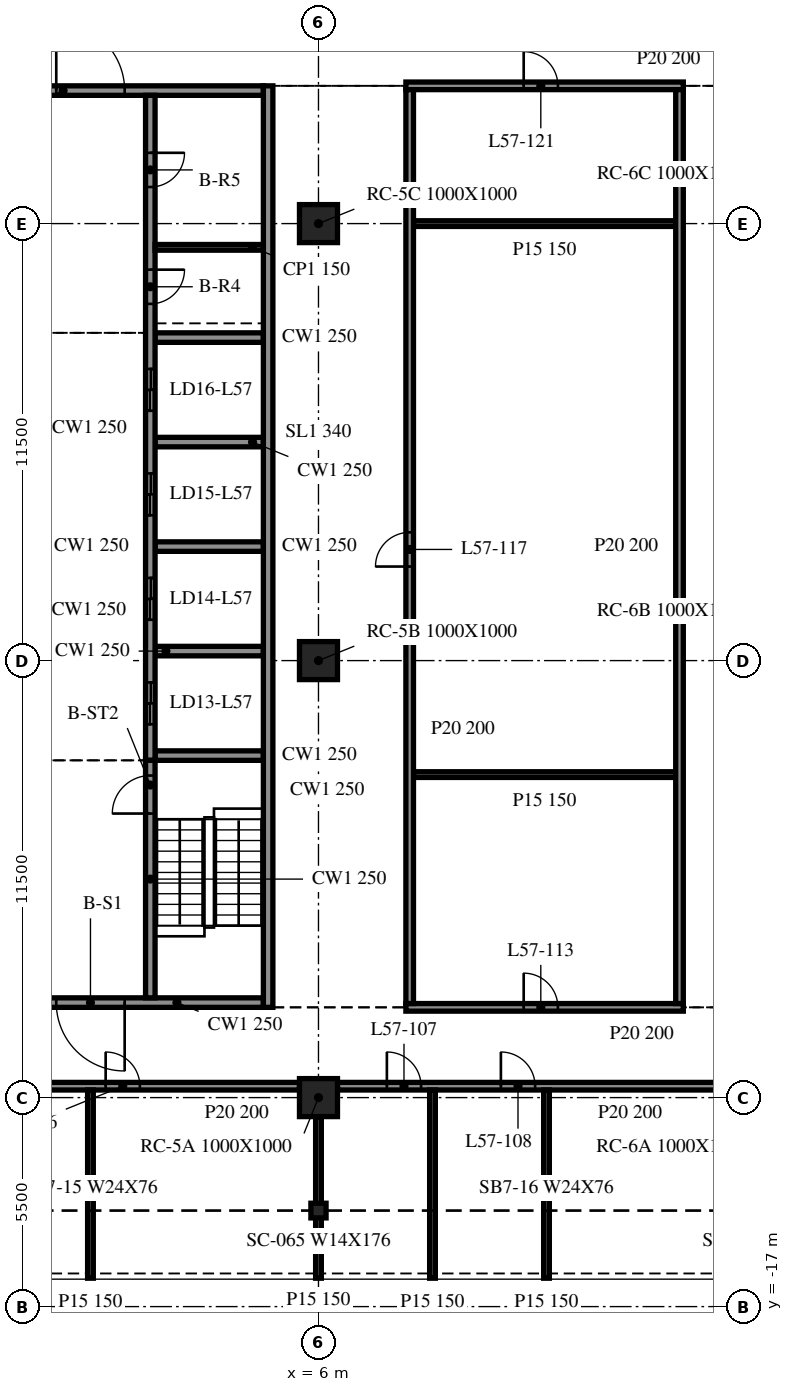
"""IFC4 building model, lengths in metres.
Left out: names, types, materials, properties, quantities, classifications, styles, units other than length and angle.
Written with IfcOpenShell. Run it as: python <this file> out.ifc"""

import sys

from ifc_helpers import new_model, si_unit, direction, frame, frame_2d, origin, origin_2d, place, context, subcontext, project, spatial, rectangle, i_section, extrude, element, fill, save


model = new_model("IFC4")
c1 = context("Model", 3, precision=1e-05, world=origin(), true_north=direction((0.0, 1.0)))
c2 = subcontext(c1, "Body", "Model", "MODEL_VIEW")
j1 = project(units=[si_unit("LENGTHUNIT", "METRE"), si_unit("PLANEANGLEUNIT", "RADIAN")], contexts=[c1])
p1 = place(None, origin())
s1 = spatial("IfcSite", under=j1, at=p1, CompositionType="ELEMENT")
p2 = place(p1, origin())
s2 = spatial("IfcBuilding", under=s1, at=p2, CompositionType="ELEMENT")
p3 = place(p2, frame((0.0, 0.0, 236.2)))
s3 = spatial("IfcBuildingStorey", under=s2, at=p3, CompositionType="ELEMENT", Elevation=236.2)
for number, where, z_axis, x_axis in (
    (1, (6.0, -11.5, -0.34), (0.0, 0.0, 1.0), (1.0, 0.0, 0.0)),
    (2, (6.0, 0.0, -0.34), (0.0, 0.0, 1.0), (1.0, 0.0, 0.0)),
    (3, (6.0, 11.5, -0.34), (0.0, 0.0, 1.0), (1.0, 0.0, 0.0)),
):
    element("IfcColumn", number, at=place(p3, frame(where, z_axis=z_axis, x_axis=x_axis)), inside=s3, PredefinedType="COLUMN", context=c2, shape_type="SweptSolid", body=[
        extrude(rectangle(XDim=1.0, YDim=1.0, at=origin_2d()), origin(), (0.0, 0.0, 1.0), 3.8),
    ])
p4 = place(p3, frame((6.0, -14.473, -0.34), z_axis=(0.0, 0.0, 1.0), x_axis=(1.0, 0.0, 0.0)))
e4 = element("IfcColumn", 4, at=p4, inside=s3, PredefinedType="COLUMN", context=c2, shape_type="SweptSolid", body=[
    extrude(i_section(OverallWidth=0.399, OverallDepth=0.386, WebThickness=0.021, FlangeThickness=0.033, at=origin_2d()), origin(), (0.0, 0.0, 1.0), 3.8),
])
p5 = place(p3, frame((4.675, -9.125, 0.0), z_axis=(0.0, 0.0, 1.0), x_axis=(0.0, 1.0, 0.0)))
e5 = element("IfcWall", 5, at=p5, inside=s3, PredefinedType="SOLIDWALL", context=c2, shape_type="SweptSolid", body=[
    extrude(rectangle(XDim=24.25, YDim=0.25, at=frame_2d((12.125, 0.0))), origin(), (0.0, 0.0, 1.0), 3.46),
])
p6 = place(p3, frame((4.55, -9.0, 0.0), z_axis=(0.0, 0.0, 1.0), x_axis=(-1.0, 0.0, 0.0)))
e6 = element("IfcWall", 6, at=p6, inside=s3, PredefinedType="SOLIDWALL", context=c2, shape_type="SweptSolid", body=[
    extrude(rectangle(XDim=9.1, YDim=0.25, at=frame_2d((4.55, 0.0))), origin(), (0.0, 0.0, 1.0), 3.46),
])
p7 = place(p6, frame((3.65, 0.0, 0.0)))
e7 = element("IfcOpeningElement", 7, at=p7, cuts=e6, PredefinedType="OPENING", context=c2, shape_type="SweptSolid", body=[
    extrude(rectangle(XDim=1.8, YDim=2.1, at=frame_2d((0.9, 1.05))), frame((0.0, 0.135, 0.0), z_axis=(0.0, -1.0, 0.0), x_axis=(1.0, 0.0, 0.0)), (0.0, 0.0, 1.0), 0.27),
])
p8 = place(p3, frame((-4.55, 15.0, 0.0), z_axis=(0.0, 0.0, 1.0), x_axis=(1.0, 0.0, 0.0)))
e8 = element("IfcWall", 8, at=p8, inside=s3, PredefinedType="SOLIDWALL", context=c2, shape_type="SweptSolid", body=[
    extrude(rectangle(XDim=9.1, YDim=0.25, at=frame_2d((4.55, 0.0))), origin(), (0.0, 0.0, 1.0), 3.46),
])
p9 = place(p8, frame((3.65, 0.0, 0.0)))
e9 = element("IfcOpeningElement", 9, at=p9, cuts=e8, PredefinedType="OPENING", context=c2, shape_type="SweptSolid", body=[
    extrude(rectangle(XDim=1.8, YDim=2.1, at=frame_2d((0.9, 1.05))), frame((0.0, 0.135, 0.0), z_axis=(0.0, -1.0, 0.0), x_axis=(1.0, 0.0, 0.0)), (0.0, 0.0, 1.0), 0.27),
])
p10 = place(p3, frame((1.575, -8.875, 0.0), z_axis=(0.0, 0.0, 1.0), x_axis=(0.0, 1.0, 0.0)))
e10 = element("IfcWall", 10, at=p10, inside=s3, PredefinedType="SOLIDWALL", context=c2, shape_type="SweptSolid", body=[
    extrude(rectangle(XDim=6.25, YDim=0.25, at=frame_2d((3.125, 0.0))), origin(), (0.0, 0.0, 1.0), 3.46),
])
p11 = place(p10, frame((4.85, 0.0, 0.0)))
e11 = element("IfcOpeningElement", 11, at=p11, cuts=e10, PredefinedType="OPENING", context=c2, shape_type="SweptSolid", body=[
    extrude(rectangle(XDim=1.0, YDim=2.1, at=frame_2d((0.5, 1.05))), frame((0.0, 0.135, 0.0), z_axis=(0.0, -1.0, 0.0), x_axis=(1.0, 0.0, 0.0)), (0.0, 0.0, 1.0), 0.27),
])
p12 = place(p3, frame((1.575, 14.875, 0.0), z_axis=(0.0, 0.0, 1.0), x_axis=(0.0, -1.0, 0.0)))
e12 = element("IfcWall", 12, at=p12, inside=s3, PredefinedType="SOLIDWALL", context=c2, shape_type="SweptSolid", body=[
    extrude(rectangle(XDim=17.5, YDim=0.25, at=frame_2d((8.75, 0.0))), origin(), (0.0, 0.0, 1.0), 3.46),
])
p13 = place(p12, frame((15.45, 0.0, 0.0)))
e13 = element("IfcOpeningElement", 13, at=p13, cuts=e12, PredefinedType="OPENING", context=c2, shape_type="SweptSolid", body=[
    extrude(rectangle(XDim=1.1, YDim=2.1, at=frame_2d((0.55, 1.05))), frame((0.0, 0.135, 0.0), z_axis=(0.0, -1.0, 0.0), x_axis=(1.0, 0.0, 0.0)), (0.0, 0.0, 1.0), 0.27),
])
p14 = place(p12, frame((12.7, 0.0, 0.0)))
e14 = element("IfcOpeningElement", 14, at=p14, cuts=e12, PredefinedType="OPENING", context=c2, shape_type="SweptSolid", body=[
    extrude(rectangle(XDim=1.1, YDim=2.1, at=frame_2d((0.55, 1.05))), frame((0.0, 0.135, 0.0), z_axis=(0.0, -1.0, 0.0), x_axis=(1.0, 0.0, 0.0)), (0.0, 0.0, 1.0), 0.27),
])
p15 = place(p12, frame((9.95, 0.0, 0.0)))
e15 = element("IfcOpeningElement", 15, at=p15, cuts=e12, PredefinedType="OPENING", context=c2, shape_type="SweptSolid", body=[
    extrude(rectangle(XDim=1.1, YDim=2.1, at=frame_2d((0.55, 1.05))), frame((0.0, 0.135, 0.0), z_axis=(0.0, -1.0, 0.0), x_axis=(1.0, 0.0, 0.0)), (0.0, 0.0, 1.0), 0.27),
])
p16 = place(p12, frame((7.2, 0.0, 0.0)))
e16 = element("IfcOpeningElement", 16, at=p16, cuts=e12, PredefinedType="OPENING", context=c2, shape_type="SweptSolid", body=[
    extrude(rectangle(XDim=1.1, YDim=2.1, at=frame_2d((0.55, 1.05))), frame((0.0, 0.135, 0.0), z_axis=(0.0, -1.0, 0.0), x_axis=(1.0, 0.0, 0.0)), (0.0, 0.0, 1.0), 0.27),
])
p17 = place(p12, frame((4.587, 0.0, 0.0)))
e17 = element("IfcOpeningElement", 17, at=p17, cuts=e12, PredefinedType="OPENING", context=c2, shape_type="SweptSolid", body=[
    extrude(rectangle(XDim=0.9, YDim=2.1, at=frame_2d((0.45, 1.05))), frame((0.0, 0.135, 0.0), z_axis=(0.0, -1.0, 0.0), x_axis=(1.0, 0.0, 0.0)), (0.0, 0.0, 1.0), 0.27),
])
p18 = place(p12, frame((1.512, 0.0, 0.0)))
e18 = element("IfcOpeningElement", 18, at=p18, cuts=e12, PredefinedType="OPENING", context=c2, shape_type="SweptSolid", body=[
    extrude(rectangle(XDim=0.9, YDim=2.1, at=frame_2d((0.45, 1.05))), frame((0.0, 0.135, 0.0), z_axis=(0.0, -1.0, 0.0), x_axis=(1.0, 0.0, 0.0)), (0.0, 0.0, 1.0), 0.27),
])
for number, where, z_axis, x_axis in (
    (19, (1.7, -2.5, 0.0), (0.0, 0.0, 1.0), (1.0, 0.0, 0.0)),
    (20, (1.7, 0.25, 0.0), (0.0, 0.0, 1.0), (1.0, 0.0, 0.0)),
    (21, (1.7, 3.0, 0.0), (0.0, 0.0, 1.0), (1.0, 0.0, 0.0)),
    (22, (1.7, 5.75, 0.0), (0.0, 0.0, 1.0), (1.0, 0.0, 0.0)),
    (23, (1.7, 8.5, 0.0), (0.0, 0.0, 1.0), (1.0, 0.0, 0.0)),
):
    element("IfcWall", number, at=place(p3, frame(where, z_axis=z_axis, x_axis=x_axis)), inside=s3, PredefinedType="SOLIDWALL", context=c2, shape_type="SweptSolid", body=[
        extrude(rectangle(XDim=2.85, YDim=0.25, at=frame_2d((1.425, 0.0))), origin(), (0.0, 0.0, 1.0), 3.46),
    ])
p19 = place(p3, frame((1.7, 10.875, 0.0), z_axis=(0.0, 0.0, 1.0), x_axis=(1.0, 0.0, 0.0)))
e24 = element("IfcWall", 24, at=p19, inside=s3, PredefinedType="PARTITIONING", context=c2, shape_type="SweptSolid", body=[
    extrude(rectangle(XDim=2.85, YDim=0.15, at=frame_2d((1.425, 0.0))), origin(), (0.0, 0.0, 1.0), 3.46),
])
p20 = place(p3, frame((-5.5, -11.2, 0.0), z_axis=(0.0, 0.0, 1.0), x_axis=(1.0, 0.0, 0.0)))
e25 = element("IfcWall", 25, at=p20, inside=s3, PredefinedType="PARTITIONING", context=c2, shape_type="SweptSolid", body=[
    extrude(rectangle(XDim=11.0, YDim=0.2, at=frame_2d((5.5, 0.0))), origin(), (0.0, 0.0, 1.0), 3.46),
])
p21 = place(p20, frame((5.9, 0.0, 0.0)))
e26 = element("IfcOpeningElement", 26, at=p21, cuts=e25, PredefinedType="OPENING", context=c2, shape_type="SweptSolid", body=[
    extrude(rectangle(XDim=0.9, YDim=2.1, at=frame_2d((0.45, 1.05))), frame((0.0, 0.11, 0.0), z_axis=(0.0, -1.0, 0.0), x_axis=(1.0, 0.0, 0.0)), (0.0, 0.0, 1.0), 0.22),
])
p22 = place(p3, frame((6.5, -11.2, 0.0), z_axis=(0.0, 0.0, 1.0), x_axis=(1.0, 0.0, 0.0)))
e27 = element("IfcWall", 27, at=p22, inside=s3, PredefinedType="PARTITIONING", context=c2, shape_type="SweptSolid", body=[
    extrude(rectangle(XDim=11.0, YDim=0.2, at=frame_2d((5.5, 0.0))), origin(), (0.0, 0.0, 1.0), 3.46),
])
p23 = place(p22, frame((1.3, 0.0, 0.0)))
e28 = element("IfcOpeningElement", 28, at=p23, cuts=e27, PredefinedType="OPENING", context=c2, shape_type="SweptSolid", body=[
    extrude(rectangle(XDim=0.9, YDim=2.1, at=frame_2d((0.45, 1.05))), frame((0.0, 0.11, 0.0), z_axis=(0.0, -1.0, 0.0), x_axis=(1.0, 0.0, 0.0)), (0.0, 0.0, 1.0), 0.22),
])
p24 = place(p22, frame((4.3, 0.0, 0.0)))
e29 = element("IfcOpeningElement", 29, at=p24, cuts=e27, PredefinedType="OPENING", context=c2, shape_type="SweptSolid", body=[
    extrude(rectangle(XDim=0.9, YDim=2.1, at=frame_2d((0.45, 1.05))), frame((0.0, 0.11, 0.0), z_axis=(0.0, -1.0, 0.0), x_axis=(1.0, 0.0, 0.0)), (0.0, 0.0, 1.0), 0.22),
])
p25 = place(p3, frame((8.3, -9.125, 0.0), z_axis=(0.0, 0.0, 1.0), x_axis=(1.0, 0.0, 0.0)))
e30 = element("IfcWall", 30, at=p25, inside=s3, PredefinedType="PARTITIONING", context=c2, shape_type="SweptSolid", body=[
    extrude(rectangle(XDim=7.3, YDim=0.2, at=frame_2d((3.65, 0.0))), origin(), (0.0, 0.0, 1.0), 3.46),
])
p26 = place(p25, frame((3.1, 0.0, 0.0)))
e31 = element("IfcOpeningElement", 31, at=p26, cuts=e30, PredefinedType="OPENING", context=c2, shape_type="SweptSolid", body=[
    extrude(rectangle(XDim=0.9, YDim=2.1, at=frame_2d((0.45, 1.05))), frame((0.0, 0.11, 0.0), z_axis=(0.0, -1.0, 0.0), x_axis=(1.0, 0.0, 0.0)), (0.0, 0.0, 1.0), 0.22),
])
for number, where, z_axis, x_axis in (
    (32, (8.5, -3.0, 0.0), (0.0, 0.0, 1.0), (1.0, 0.0, 0.0)),
    (33, (8.5, 11.5, 0.0), (0.0, 0.0, 1.0), (1.0, 0.0, 0.0)),
):
    element("IfcWall", number, at=place(p3, frame(where, z_axis=z_axis, x_axis=x_axis)), inside=s3, PredefinedType="PARTITIONING", context=c2, shape_type="SweptSolid", body=[
        extrude(rectangle(XDim=6.9, YDim=0.15, at=frame_2d((3.45, 0.0))), origin(), (0.0, 0.0, 1.0), 3.46),
    ])
p27 = place(p3, frame((8.3, 15.125, 0.0), z_axis=(0.0, 0.0, 1.0), x_axis=(1.0, 0.0, 0.0)))
e34 = element("IfcWall", 34, at=p27, inside=s3, PredefinedType="PARTITIONING", context=c2, shape_type="SweptSolid", body=[
    extrude(rectangle(XDim=7.3, YDim=0.2, at=frame_2d((3.65, 0.0))), origin(), (0.0, 0.0, 1.0), 3.46),
])
p28 = place(p27, frame((3.1, 0.0, 0.0)))
e35 = element("IfcOpeningElement", 35, at=p28, cuts=e34, PredefinedType="OPENING", context=c2, shape_type="SweptSolid", body=[
    extrude(rectangle(XDim=0.9, YDim=2.1, at=frame_2d((0.45, 1.05))), frame((0.0, 0.11, 0.0), z_axis=(0.0, -1.0, 0.0), x_axis=(1.0, 0.0, 0.0)), (0.0, 0.0, 1.0), 0.22),
])
p29 = place(p3, frame((0.0, -16.253, 0.0), z_axis=(0.0, 0.0, 1.0), x_axis=(0.0, 1.0, 0.0)))
e36 = element("IfcWall", 36, at=p29, inside=s3, PredefinedType="PARTITIONING", context=c2, shape_type="SweptSolid", body=[
    extrude(rectangle(XDim=4.953, YDim=0.15, at=frame_2d((2.477, 0.0))), origin(), (0.0, 0.0, 1.0), 3.46),
])
p30 = place(p3, frame((6.0, -16.253, 0.0), z_axis=(0.0, 0.0, 1.0), x_axis=(0.0, 1.0, 0.0)))
e37 = element("IfcWall", 37, at=p30, inside=s3, PredefinedType="PARTITIONING", context=c2, shape_type="SweptSolid", body=[
    extrude(rectangle(XDim=4.253, YDim=0.15, at=frame_2d((2.126, 0.0))), origin(), (0.0, 0.0, 1.0), 3.46),
])
p31 = place(p3, frame((8.4, -9.025, 0.0), z_axis=(0.0, 0.0, 1.0), x_axis=(0.0, 1.0, 0.0)))
e38 = element("IfcWall", 38, at=p31, inside=s3, PredefinedType="PARTITIONING", context=c2, shape_type="SweptSolid", body=[
    extrude(rectangle(XDim=24.05, YDim=0.2, at=frame_2d((12.025, 0.0))), origin(), (0.0, 0.0, 1.0), 3.46),
])
p32 = place(p31, frame((11.5, 0.0, 0.0)))
e39 = element("IfcOpeningElement", 39, at=p32, cuts=e38, PredefinedType="OPENING", context=c2, shape_type="SweptSolid", body=[
    extrude(rectangle(XDim=0.9, YDim=2.1, at=frame_2d((0.45, 1.05))), frame((0.0, 0.11, 0.0), z_axis=(0.0, -1.0, 0.0), x_axis=(1.0, 0.0, 0.0)), (0.0, 0.0, 1.0), 0.22),
])
for number, where, z_axis, x_axis in (
    (40, (9.0, -16.253, 0.0), (0.0, 0.0, 1.0), (0.0, 1.0, 0.0)),
    (41, (12.0, -16.253, 0.0), (0.0, 0.0, 1.0), (0.0, 1.0, 0.0)),
):
    element("IfcWall", number, at=place(p3, frame(where, z_axis=z_axis, x_axis=x_axis)), inside=s3, PredefinedType="PARTITIONING", context=c2, shape_type="SweptSolid", body=[
        extrude(rectangle(XDim=4.953, YDim=0.15, at=frame_2d((2.477, 0.0))), origin(), (0.0, 0.0, 1.0), 3.46),
    ])
p33 = place(p3, frame((15.5, -9.025, 0.0), z_axis=(0.0, 0.0, 1.0), x_axis=(0.0, 1.0, 0.0)))
e42 = element("IfcWall", 42, at=p33, inside=s3, PredefinedType="PARTITIONING", context=c2, shape_type="SweptSolid", body=[
    extrude(rectangle(XDim=24.05, YDim=0.2, at=frame_2d((12.025, 0.0))), origin(), (0.0, 0.0, 1.0), 3.46),
])
p34 = place(p7, origin())
e43 = element("IfcDoor", 43, at=p34, inside=s3, OperationType="DOUBLE_DOOR_SINGLE_SWING", PredefinedType="DOOR", context=c2, shape_type="SweptSolid", body=[
    extrude(rectangle(XDim=1.8, YDim=2.1, at=frame_2d((0.9, 1.05))), frame((0.0, 0.025, 0.0), z_axis=(0.0, -1.0, 0.0), x_axis=(1.0, 0.0, 0.0)), (0.0, 0.0, 1.0), 0.05),
])
fill(e7, e43)
p35 = place(p9, origin())
e44 = element("IfcDoor", 44, at=p35, inside=s3, OperationType="DOUBLE_DOOR_SINGLE_SWING", PredefinedType="DOOR", context=c2, shape_type="SweptSolid", body=[
    extrude(rectangle(XDim=1.8, YDim=2.1, at=frame_2d((0.9, 1.05))), frame((0.0, 0.025, 0.0), z_axis=(0.0, -1.0, 0.0), x_axis=(1.0, 0.0, 0.0)), (0.0, 0.0, 1.0), 0.05),
])
fill(e9, e44)
p36 = place(p13, origin())
e45 = element("IfcDoor", 45, at=p36, inside=s3, OperationType="DOUBLE_DOOR_SLIDING", PredefinedType="DOOR", context=c2, shape_type="SweptSolid", body=[
    extrude(rectangle(XDim=1.1, YDim=2.1, at=frame_2d((0.55, 1.05))), frame((0.0, 0.025, 0.0), z_axis=(0.0, -1.0, 0.0), x_axis=(1.0, 0.0, 0.0)), (0.0, 0.0, 1.0), 0.05),
])
fill(e13, e45)
p37 = place(p14, origin())
e46 = element("IfcDoor", 46, at=p37, inside=s3, OperationType="DOUBLE_DOOR_SLIDING", PredefinedType="DOOR", context=c2, shape_type="SweptSolid", body=[
    extrude(rectangle(XDim=1.1, YDim=2.1, at=frame_2d((0.55, 1.05))), frame((0.0, 0.025, 0.0), z_axis=(0.0, -1.0, 0.0), x_axis=(1.0, 0.0, 0.0)), (0.0, 0.0, 1.0), 0.05),
])
fill(e14, e46)
p38 = place(p15, origin())
e47 = element("IfcDoor", 47, at=p38, inside=s3, OperationType="DOUBLE_DOOR_SLIDING", PredefinedType="DOOR", context=c2, shape_type="SweptSolid", body=[
    extrude(rectangle(XDim=1.1, YDim=2.1, at=frame_2d((0.55, 1.05))), frame((0.0, 0.025, 0.0), z_axis=(0.0, -1.0, 0.0), x_axis=(1.0, 0.0, 0.0)), (0.0, 0.0, 1.0), 0.05),
])
fill(e15, e47)
p39 = place(p16, origin())
e48 = element("IfcDoor", 48, at=p39, inside=s3, OperationType="DOUBLE_DOOR_SLIDING", PredefinedType="DOOR", context=c2, shape_type="SweptSolid", body=[
    extrude(rectangle(XDim=1.1, YDim=2.1, at=frame_2d((0.55, 1.05))), frame((0.0, 0.025, 0.0), z_axis=(0.0, -1.0, 0.0), x_axis=(1.0, 0.0, 0.0)), (0.0, 0.0, 1.0), 0.05),
])
fill(e16, e48)
p40 = place(p17, origin())
e49 = element("IfcDoor", 49, at=p40, inside=s3, OperationType="SINGLE_SWING_RIGHT", PredefinedType="DOOR", context=c2, shape_type="SweptSolid", body=[
    extrude(rectangle(XDim=0.9, YDim=2.1, at=frame_2d((0.45, 1.05))), frame((0.0, 0.025, 0.0), z_axis=(0.0, -1.0, 0.0), x_axis=(1.0, 0.0, 0.0)), (0.0, 0.0, 1.0), 0.05),
])
fill(e17, e49)
p41 = place(p18, origin())
e50 = element("IfcDoor", 50, at=p41, inside=s3, OperationType="SINGLE_SWING_LEFT", PredefinedType="DOOR", context=c2, shape_type="SweptSolid", body=[
    extrude(rectangle(XDim=0.9, YDim=2.1, at=frame_2d((0.45, 1.05))), frame((0.0, 0.025, 0.0), z_axis=(0.0, -1.0, 0.0), x_axis=(1.0, 0.0, 0.0)), (0.0, 0.0, 1.0), 0.05),
])
fill(e18, e50)
p42 = place(p11, origin())
e51 = element("IfcDoor", 51, at=p42, inside=s3, OperationType="SINGLE_SWING_RIGHT", PredefinedType="DOOR", context=c2, shape_type="SweptSolid", body=[
    extrude(rectangle(XDim=1.0, YDim=2.1, at=frame_2d((0.5, 1.05))), frame((0.0, 0.025, 0.0), z_axis=(0.0, -1.0, 0.0), x_axis=(1.0, 0.0, 0.0)), (0.0, 0.0, 1.0), 0.05),
])
fill(e11, e51)
p43 = place(p21, origin())
e52 = element("IfcDoor", 52, at=p43, inside=s3, OperationType="SINGLE_SWING_LEFT", PredefinedType="DOOR", context=c2, shape_type="SweptSolid", body=[
    extrude(rectangle(XDim=0.9, YDim=2.1, at=frame_2d((0.45, 1.05))), frame((0.0, 0.025, 0.0), z_axis=(0.0, -1.0, 0.0), x_axis=(1.0, 0.0, 0.0)), (0.0, 0.0, 1.0), 0.05),
])
fill(e26, e52)
p44 = place(p23, origin())
e53 = element("IfcDoor", 53, at=p44, inside=s3, OperationType="SINGLE_SWING_RIGHT", PredefinedType="DOOR", context=c2, shape_type="SweptSolid", body=[
    extrude(rectangle(XDim=0.9, YDim=2.1, at=frame_2d((0.45, 1.05))), frame((0.0, 0.025, 0.0), z_axis=(0.0, -1.0, 0.0), x_axis=(1.0, 0.0, 0.0)), (0.0, 0.0, 1.0), 0.05),
])
fill(e28, e53)
p45 = place(p24, origin())
e54 = element("IfcDoor", 54, at=p45, inside=s3, OperationType="SINGLE_SWING_RIGHT", PredefinedType="DOOR", context=c2, shape_type="SweptSolid", body=[
    extrude(rectangle(XDim=0.9, YDim=2.1, at=frame_2d((0.45, 1.05))), frame((0.0, 0.025, 0.0), z_axis=(0.0, -1.0, 0.0), x_axis=(1.0, 0.0, 0.0)), (0.0, 0.0, 1.0), 0.05),
])
fill(e29, e54)
p46 = place(p26, origin())
e55 = element("IfcDoor", 55, at=p46, inside=s3, OperationType="SINGLE_SWING_LEFT", PredefinedType="DOOR", context=c2, shape_type="SweptSolid", body=[
    extrude(rectangle(XDim=0.9, YDim=2.1, at=frame_2d((0.45, 1.05))), frame((0.0, 0.025, 0.0), z_axis=(0.0, -1.0, 0.0), x_axis=(1.0, 0.0, 0.0)), (0.0, 0.0, 1.0), 0.05),
])
fill(e31, e55)
p47 = place(p32, origin())
e56 = element("IfcDoor", 56, at=p47, inside=s3, OperationType="SINGLE_SWING_RIGHT", PredefinedType="DOOR", context=c2, shape_type="SweptSolid", body=[
    extrude(rectangle(XDim=0.9, YDim=2.1, at=frame_2d((0.45, 1.05))), frame((0.0, 0.025, 0.0), z_axis=(0.0, -1.0, 0.0), x_axis=(1.0, 0.0, 0.0)), (0.0, 0.0, 1.0), 0.05),
])
fill(e39, e56)
p48 = place(p28, origin())
e57 = element("IfcDoor", 57, at=p48, inside=s3, OperationType="SINGLE_SWING_RIGHT", PredefinedType="DOOR", context=c2, shape_type="SweptSolid", body=[
    extrude(rectangle(XDim=0.9, YDim=2.1, at=frame_2d((0.45, 1.05))), frame((0.0, 0.025, 0.0), z_axis=(0.0, -1.0, 0.0), x_axis=(1.0, 0.0, 0.0)), (0.0, 0.0, 1.0), 0.05),
])
fill(e35, e57)
save(model, sys.argv[1])
